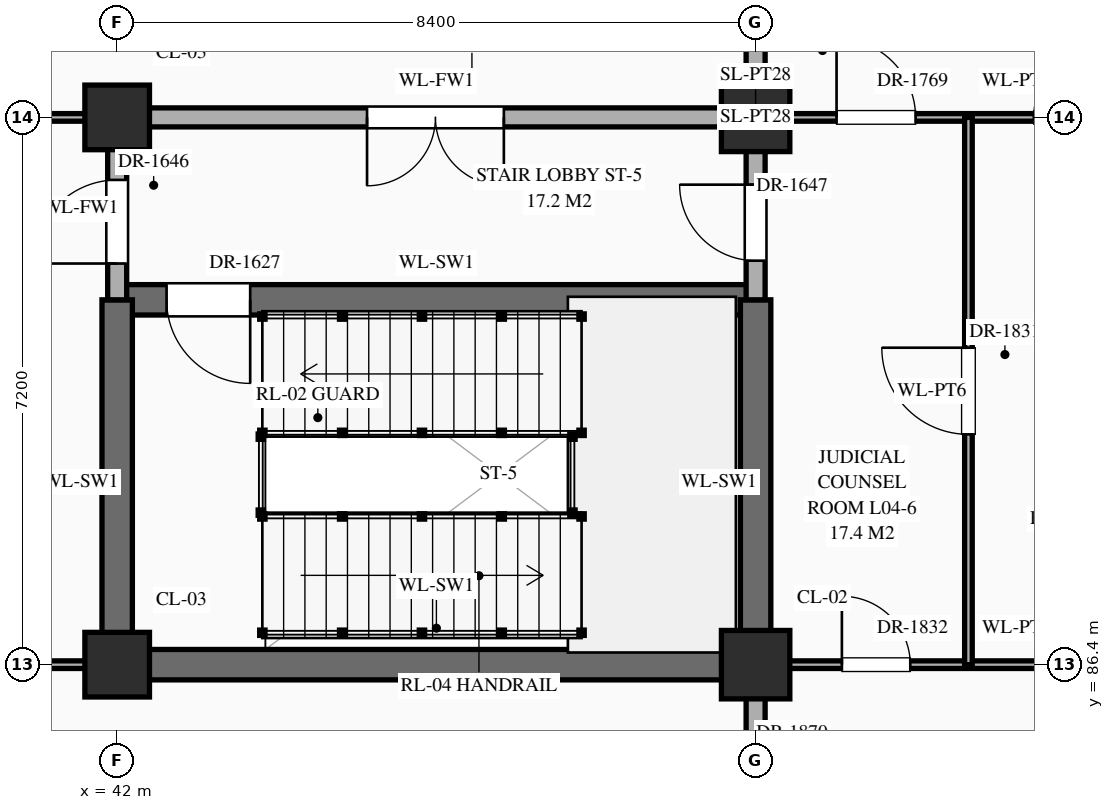
"""IFC4 building model, lengths in metres.
Left out: names, types, materials, properties, quantities, classifications, styles, units other than length and angle.
Written with IfcOpenShell. Run it as: python <this file> out.ifc"""

import sys

from ifc_helpers import new_model, si_unit, direction, frame, frame_2d, origin, origin_2d, place, context, subcontext, project, spatial, rectangle, extrude, element, fill, save


model = new_model("IFC4")
c1 = context("Model", 3, precision=1e-05, world=origin(), true_north=direction((0.0, 1.0)))
c2 = subcontext(c1, "Body", "Model", "MODEL_VIEW")
j1 = project(units=[si_unit("LENGTHUNIT", "METRE"), si_unit("PLANEANGLEUNIT", "RADIAN")], contexts=[c1])
p1 = place(None, origin())
s1 = spatial("IfcSite", under=j1, at=p1, CompositionType="ELEMENT")
p2 = place(p1, origin())
s2 = spatial("IfcBuilding", under=s1, at=p2, CompositionType="ELEMENT")
p3 = place(p2, frame((0.0, 0.0, 16.2)))
s3 = spatial("IfcBuildingStorey", under=s2, at=p3, CompositionType="ELEMENT", Elevation=16.2)
for number, where, z_axis, x_axis in (
    (1, (42.0, 86.4, 0.0), (0.0, 0.0, 1.0), (1.0, 0.0, 0.0)),
    (2, (42.0, 93.6, 0.0), (0.0, 0.0, 1.0), (1.0, 0.0, 0.0)),
):
    element("IfcColumn", number, at=place(p3, frame(where, z_axis=z_axis, x_axis=x_axis)), inside=s3, PredefinedType="COLUMN", context=c2, shape_type="SweptSolid", body=[
        extrude(rectangle(XDim=0.85, YDim=0.85, at=origin_2d()), origin(), (0.0, 0.0, 1.0), 5.4),
    ])
for number, where, z_axis, x_axis in (
    (3, (50.4, 86.4, 0.0), (0.0, 0.0, 1.0), (1.0, 0.0, 0.0)),
    (4, (50.4, 93.6, 0.0), (0.0, 0.0, 1.0), (1.0, 0.0, 0.0)),
):
    element("IfcColumn", number, at=place(p3, frame(where, z_axis=z_axis, x_axis=x_axis)), inside=s3, PredefinedType="COLUMN", context=c2, shape_type="SweptSolid", body=[
        extrude(rectangle(XDim=0.9, YDim=0.9, at=origin_2d()), origin(), (0.0, 0.0, 1.0), 5.4),
    ])
p4 = place(p3, frame((25.2, 86.4, 0.0), z_axis=(0.0, 0.0, 1.0), x_axis=(1.0, 0.0, 0.0)))
e5 = element("IfcWall", 5, at=p4, inside=s3, PredefinedType="STANDARD", context=c2, shape_type="SweptSolid", body=[
    extrude(rectangle(XDim=16.8, YDim=0.1, at=frame_2d((8.4, 0.0))), origin(), (0.0, 0.0, 1.0), 4.27),
])
p5 = place(p4, frame((0.933, 0.0, 0.0)))
e6 = element("IfcOpeningElement", 6, at=p5, cuts=e5, PredefinedType="OPENING", context=c2, shape_type="SweptSolid", body=[
    extrude(rectangle(XDim=1.28, YDim=2.35, at=frame_2d((0.64, 1.175))), frame((0.0, 0.062, 0.0), z_axis=(0.0, -1.0, 0.0), x_axis=(1.0, 0.0, 0.0)), (0.0, 0.0, 1.0), 0.124),
])
p6 = place(p4, frame((3.425, 0.0, 0.0)))
e7 = element("IfcOpeningElement", 7, at=p6, cuts=e5, PredefinedType="OPENING", context=c2, shape_type="SweptSolid", body=[
    extrude(rectangle(XDim=1.55, YDim=2.35, at=frame_2d((0.775, 1.175))), frame((0.0, 0.062, 0.0), z_axis=(0.0, -1.0, 0.0), x_axis=(1.0, 0.0, 0.0)), (0.0, 0.0, 1.0), 0.124),
])
p7 = place(p4, frame((6.317, 0.0, 0.0)))
e8 = element("IfcOpeningElement", 8, at=p7, cuts=e5, PredefinedType="OPENING", context=c2, shape_type="SweptSolid", body=[
    extrude(rectangle(XDim=1.02, YDim=2.4, at=frame_2d((0.51, 1.2))), frame((0.0, 0.062, 0.0), z_axis=(0.0, -1.0, 0.0), x_axis=(1.0, 0.0, 0.0)), (0.0, 0.0, 1.0), 0.124),
])
p8 = place(p4, frame((12.07, 0.0, 0.0)))
e9 = element("IfcOpeningElement", 9, at=p8, cuts=e5, PredefinedType="OPENING", context=c2, shape_type="SweptSolid", body=[
    extrude(rectangle(XDim=1.06, YDim=2.4, at=frame_2d((0.53, 1.2))), frame((0.0, 0.062, 0.0), z_axis=(0.0, -1.0, 0.0), x_axis=(1.0, 0.0, 0.0)), (0.0, 0.0, 1.0), 0.124),
])
p9 = place(p3, frame((42.0, 86.4, 0.0), z_axis=(0.0, 0.0, 1.0), x_axis=(1.0, 0.0, 0.0)))
e10 = element("IfcWall", 10, at=p9, inside=s3, PredefinedType="SHEAR", context=c2, shape_type="SweptSolid", body=[
    extrude(rectangle(XDim=8.4, YDim=0.4, at=frame_2d((4.2, 0.0))), origin(), (0.0, 0.0, 1.0), 5.12),
])
p10 = place(p3, frame((50.4, 86.4, 0.0), z_axis=(0.0, 0.0, 1.0), x_axis=(1.0, 0.0, 0.0)))
e11 = element("IfcWall", 11, at=p10, inside=s3, PredefinedType="STANDARD", context=c2, shape_type="SweptSolid", body=[
    extrude(rectangle(XDim=8.4, YDim=0.1, at=frame_2d((4.2, 0.0))), origin(), (0.0, 0.0, 1.0), 4.27),
])
p11 = place(p10, frame((1.135, 0.0, 0.0)))
e12 = element("IfcOpeningElement", 12, at=p11, cuts=e11, PredefinedType="OPENING", context=c2, shape_type="SweptSolid", body=[
    extrude(rectangle(XDim=0.9, YDim=2.15, at=frame_2d((0.45, 1.075))), frame((0.0, 0.062, 0.0), z_axis=(0.0, -1.0, 0.0), x_axis=(1.0, 0.0, 0.0)), (0.0, 0.0, 1.0), 0.124),
])
p12 = place(p10, frame((3.74, 0.0, 0.0)))
e13 = element("IfcOpeningElement", 13, at=p12, cuts=e11, PredefinedType="OPENING", context=c2, shape_type="SweptSolid", body=[
    extrude(rectangle(XDim=0.92, YDim=2.15, at=frame_2d((0.46, 1.075))), frame((0.0, 0.062, 0.0), z_axis=(0.0, -1.0, 0.0), x_axis=(1.0, 0.0, 0.0)), (0.0, 0.0, 1.0), 0.124),
])
p13 = place(p10, frame((6.335, 0.0, 0.0)))
e14 = element("IfcOpeningElement", 14, at=p13, cuts=e11, PredefinedType="OPENING", context=c2, shape_type="SweptSolid", body=[
    extrude(rectangle(XDim=0.96, YDim=2.2, at=frame_2d((0.48, 1.1))), frame((0.0, 0.062, 0.0), z_axis=(0.0, -1.0, 0.0), x_axis=(1.0, 0.0, 0.0)), (0.0, 0.0, 1.0), 0.124),
])
p14 = place(p3, frame((42.0, 91.2, 0.0), z_axis=(0.0, 0.0, 1.0), x_axis=(1.0, 0.0, 0.0)))
e15 = element("IfcWall", 15, at=p14, inside=s3, PredefinedType="SHEAR", context=c2, shape_type="SweptSolid", body=[
    extrude(rectangle(XDim=8.4, YDim=0.4, at=frame_2d((4.2, 0.0))), origin(), (0.0, 0.0, 1.0), 5.12),
])
p15 = place(p14, frame((0.65, 0.0, 0.0)))
e16 = element("IfcOpeningElement", 16, at=p15, cuts=e15, PredefinedType="OPENING", context=c2, shape_type="SweptSolid", body=[
    extrude(rectangle(XDim=1.1, YDim=2.2, at=frame_2d((0.55, 1.1))), frame((0.0, 0.212, 0.0), z_axis=(0.0, -1.0, 0.0), x_axis=(1.0, 0.0, 0.0)), (0.0, 0.0, 1.0), 0.424),
])
p16 = place(p3, frame((25.2, 93.6, 0.0), z_axis=(0.0, 0.0, 1.0), x_axis=(1.0, 0.0, 0.0)))
e17 = element("IfcWall", 17, at=p16, inside=s3, PredefinedType="STANDARD", context=c2, shape_type="SweptSolid", body=[
    extrude(rectangle(XDim=16.8, YDim=0.1, at=frame_2d((8.4, 0.0))), origin(), (0.0, 0.0, 1.0), 4.27),
])
p17 = place(p16, frame((0.933, 0.0, 0.0)))
e18 = element("IfcOpeningElement", 18, at=p17, cuts=e17, PredefinedType="OPENING", context=c2, shape_type="SweptSolid", body=[
    extrude(rectangle(XDim=1.28, YDim=2.35, at=frame_2d((0.64, 1.175))), frame((0.0, 0.062, 0.0), z_axis=(0.0, -1.0, 0.0), x_axis=(1.0, 0.0, 0.0)), (0.0, 0.0, 1.0), 0.124),
])
p18 = place(p16, frame((3.25, 0.0, 0.0)))
e19 = element("IfcOpeningElement", 19, at=p18, cuts=e17, PredefinedType="OPENING", context=c2, shape_type="SweptSolid", body=[
    extrude(rectangle(XDim=1.9, YDim=2.5, at=frame_2d((0.95, 1.25))), frame((0.0, 0.062, 0.0), z_axis=(0.0, -1.0, 0.0), x_axis=(1.0, 0.0, 0.0)), (0.0, 0.0, 1.0), 0.124),
])
p19 = place(p16, frame((6.337, 0.0, 0.0)))
e20 = element("IfcOpeningElement", 20, at=p19, cuts=e17, PredefinedType="OPENING", context=c2, shape_type="SweptSolid", body=[
    extrude(rectangle(XDim=0.98, YDim=2.35, at=frame_2d((0.49, 1.175))), frame((0.0, 0.062, 0.0), z_axis=(0.0, -1.0, 0.0), x_axis=(1.0, 0.0, 0.0)), (0.0, 0.0, 1.0), 0.124),
])
p20 = place(p16, frame((12.09, 0.0, 0.0)))
e21 = element("IfcOpeningElement", 21, at=p20, cuts=e17, PredefinedType="OPENING", context=c2, shape_type="SweptSolid", body=[
    extrude(rectangle(XDim=1.02, YDim=2.4, at=frame_2d((0.51, 1.2))), frame((0.0, 0.062, 0.0), z_axis=(0.0, -1.0, 0.0), x_axis=(1.0, 0.0, 0.0)), (0.0, 0.0, 1.0), 0.124),
])
p21 = place(p3, frame((42.0, 93.6, 0.0), z_axis=(0.0, 0.0, 1.0), x_axis=(1.0, 0.0, 0.0)))
e22 = element("IfcWall", 22, at=p21, inside=s3, PredefinedType="STANDARD", context=c2, shape_type="SweptSolid", body=[
    extrude(rectangle(XDim=8.4, YDim=0.25, at=frame_2d((4.2, 0.0))), origin(), (0.0, 0.0, 1.0), 4.27),
])
p22 = place(p21, frame((3.288, 0.0, 0.0)))
e23 = element("IfcOpeningElement", 23, at=p22, cuts=e22, PredefinedType="OPENING", context=c2, shape_type="SweptSolid", body=[
    extrude(rectangle(XDim=1.8, YDim=2.35, at=frame_2d((0.9, 1.175))), frame((0.0, 0.137, 0.0), z_axis=(0.0, -1.0, 0.0), x_axis=(1.0, 0.0, 0.0)), (0.0, 0.0, 1.0), 0.274),
])
p23 = place(p3, frame((50.4, 93.6, 0.0), z_axis=(0.0, 0.0, 1.0), x_axis=(1.0, 0.0, 0.0)))
e24 = element("IfcWall", 24, at=p23, inside=s3, PredefinedType="STANDARD", context=c2, shape_type="SweptSolid", body=[
    extrude(rectangle(XDim=8.4, YDim=0.1, at=frame_2d((4.2, 0.0))), origin(), (0.0, 0.0, 1.0), 4.27),
])
p24 = place(p23, frame((1.065, 0.0, 0.0)))
e25 = element("IfcOpeningElement", 25, at=p24, cuts=e24, PredefinedType="OPENING", context=c2, shape_type="SweptSolid", body=[
    extrude(rectangle(XDim=1.04, YDim=2.2, at=frame_2d((0.52, 1.1))), frame((0.0, 0.062, 0.0), z_axis=(0.0, -1.0, 0.0), x_axis=(1.0, 0.0, 0.0)), (0.0, 0.0, 1.0), 0.124),
])
p25 = place(p23, frame((3.66, 0.0, 0.0)))
e26 = element("IfcOpeningElement", 26, at=p25, cuts=e24, PredefinedType="OPENING", context=c2, shape_type="SweptSolid", body=[
    extrude(rectangle(XDim=1.08, YDim=2.25, at=frame_2d((0.54, 1.125))), frame((0.0, 0.062, 0.0), z_axis=(0.0, -1.0, 0.0), x_axis=(1.0, 0.0, 0.0)), (0.0, 0.0, 1.0), 0.124),
])
p26 = place(p23, frame((6.255, 0.0, 0.0)))
e27 = element("IfcOpeningElement", 27, at=p26, cuts=e24, PredefinedType="OPENING", context=c2, shape_type="SweptSolid", body=[
    extrude(rectangle(XDim=1.12, YDim=2.25, at=frame_2d((0.56, 1.125))), frame((0.0, 0.062, 0.0), z_axis=(0.0, -1.0, 0.0), x_axis=(1.0, 0.0, 0.0)), (0.0, 0.0, 1.0), 0.124),
])
p27 = place(p3, frame((42.0, 86.4, 0.0), z_axis=(0.0, 0.0, 1.0), x_axis=(0.0, 1.0, 0.0)))
e28 = element("IfcWall", 28, at=p27, inside=s3, PredefinedType="SHEAR", context=c2, shape_type="SweptSolid", body=[
    extrude(rectangle(XDim=4.8, YDim=0.4, at=frame_2d((2.4, 0.0))), origin(), (0.0, 0.0, 1.0), 5.12),
])
p28 = place(p3, frame((42.0, 91.2, 0.0), z_axis=(0.0, 0.0, 1.0), x_axis=(0.0, 1.0, 0.0)))
e29 = element("IfcWall", 29, at=p28, inside=s3, PredefinedType="STANDARD", context=c2, shape_type="SweptSolid", body=[
    extrude(rectangle(XDim=2.4, YDim=0.25, at=frame_2d((1.2, 0.0))), origin(), (0.0, 0.0, 1.0), 4.37),
])
p29 = place(p28, frame((0.478, 0.0, 0.0)))
e30 = element("IfcOpeningElement", 30, at=p29, cuts=e29, PredefinedType="OPENING", context=c2, shape_type="SweptSolid", body=[
    extrude(rectangle(XDim=1.1, YDim=2.2, at=frame_2d((0.55, 1.1))), frame((0.0, 0.137, 0.0), z_axis=(0.0, -1.0, 0.0), x_axis=(1.0, 0.0, 0.0)), (0.0, 0.0, 1.0), 0.274),
])
p30 = place(p3, frame((50.4, 79.24, 0.0), z_axis=(0.0, 0.0, 1.0), x_axis=(0.0, 1.0, 0.0)))
e31 = element("IfcWall", 31, at=p30, inside=s3, PredefinedType="STANDARD", context=c2, shape_type="SweptSolid", body=[
    extrude(rectangle(XDim=7.16, YDim=0.25, at=frame_2d((3.58, 0.0))), origin(), (0.0, 0.0, 1.0), 4.37),
])
p31 = place(p30, frame((5.3, 0.0, 0.0)))
e32 = element("IfcOpeningElement", 32, at=p31, cuts=e31, PredefinedType="OPENING", context=c2, shape_type="SweptSolid", body=[
    extrude(rectangle(XDim=0.95, YDim=2.15, at=frame_2d((0.475, 1.075))), frame((0.0, 0.137, 0.0), z_axis=(0.0, -1.0, 0.0), x_axis=(1.0, 0.0, 0.0)), (0.0, 0.0, 1.0), 0.274),
])
p32 = place(p3, frame((50.4, 86.4, 0.0), z_axis=(0.0, 0.0, 1.0), x_axis=(0.0, 1.0, 0.0)))
e33 = element("IfcWall", 33, at=p32, inside=s3, PredefinedType="SHEAR", context=c2, shape_type="SweptSolid", body=[
    extrude(rectangle(XDim=4.8, YDim=0.4, at=frame_2d((2.4, 0.0))), origin(), (0.0, 0.0, 1.0), 5.12),
])
p33 = place(p3, frame((50.4, 91.2, 0.0), z_axis=(0.0, 0.0, 1.0), x_axis=(0.0, 1.0, 0.0)))
e34 = element("IfcWall", 34, at=p33, inside=s3, PredefinedType="STANDARD", context=c2, shape_type="SweptSolid", body=[
    extrude(rectangle(XDim=13.2, YDim=0.25, at=frame_2d((6.6, 0.0))), origin(), (0.0, 0.0, 1.0), 4.37),
])
p34 = place(p33, frame((0.515, 0.0, 0.0)))
e35 = element("IfcOpeningElement", 35, at=p34, cuts=e34, PredefinedType="OPENING", context=c2, shape_type="SweptSolid", body=[
    extrude(rectangle(XDim=1.0, YDim=2.2, at=frame_2d((0.5, 1.1))), frame((0.0, 0.137, 0.0), z_axis=(0.0, -1.0, 0.0), x_axis=(1.0, 0.0, 0.0)), (0.0, 0.0, 1.0), 0.274),
])
p35 = place(p33, frame((10.485, 0.0, 0.0)))
e36 = element("IfcOpeningElement", 36, at=p35, cuts=e34, PredefinedType="OPENING", context=c2, shape_type="SweptSolid", body=[
    extrude(rectangle(XDim=1.0, YDim=2.2, at=frame_2d((0.5, 1.1))), frame((0.0, 0.137, 0.0), z_axis=(0.0, -1.0, 0.0), x_axis=(1.0, 0.0, 0.0)), (0.0, 0.0, 1.0), 0.274),
])
p36 = place(p33, frame((3.285, 0.0, 0.0)))
e37 = element("IfcOpeningElement", 37, at=p36, cuts=e34, PredefinedType="OPENING", context=c2, shape_type="SweptSolid", body=[
    extrude(rectangle(XDim=1.0, YDim=2.2, at=frame_2d((0.5, 1.1))), frame((0.0, 0.137, 0.0), z_axis=(0.0, -1.0, 0.0), x_axis=(1.0, 0.0, 0.0)), (0.0, 0.0, 1.0), 0.274),
])
p37 = place(p3, frame((53.2, 86.4, 0.0), z_axis=(0.0, 0.0, 1.0), x_axis=(0.0, 1.0, 0.0)))
e38 = element("IfcWall", 38, at=p37, inside=s3, PredefinedType="STANDARD", context=c2, shape_type="SweptSolid", body=[
    extrude(rectangle(XDim=7.2, YDim=0.1, at=frame_2d((3.6, 0.0))), origin(), (0.0, 0.0, 1.0), 5.12),
])
p38 = place(p37, frame((3.03, 0.0, 0.0)))
e39 = element("IfcOpeningElement", 39, at=p38, cuts=e38, PredefinedType="OPENING", context=c2, shape_type="SweptSolid", body=[
    extrude(rectangle(XDim=1.14, YDim=2.4, at=frame_2d((0.57, 1.2))), frame((0.0, 0.062, 0.0), z_axis=(0.0, -1.0, 0.0), x_axis=(1.0, 0.0, 0.0)), (0.0, 0.0, 1.0), 0.124),
])
p39 = place(p15, frame((1.1, 0.0, 0.0), z_axis=(0.0, 0.0, 1.0), x_axis=(-1.0, 0.0, 0.0)))
e40 = element("IfcDoor", 40, at=p39, inside=s3, OperationType="SINGLE_SWING_LEFT", PredefinedType="DOOR", context=c2, shape_type="SweptSolid", body=[
    extrude(rectangle(XDim=1.1, YDim=2.2, at=frame_2d((0.55, 1.1))), frame((0.0, 0.025, 0.0), z_axis=(0.0, -1.0, 0.0), x_axis=(1.0, 0.0, 0.0)), (0.0, 0.0, 1.0), 0.05),
])
fill(e16, e40)
p40 = place(p22, frame((1.8, 0.0, 0.0), z_axis=(0.0, 0.0, 1.0), x_axis=(-1.0, 0.0, 0.0)))
e41 = element("IfcDoor", 41, at=p40, inside=s3, OperationType="DOUBLE_DOOR_SINGLE_SWING", PredefinedType="DOOR", context=c2, shape_type="SweptSolid", body=[
    extrude(rectangle(XDim=1.8, YDim=2.35, at=frame_2d((0.9, 1.175))), frame((0.0, 0.025, 0.0), z_axis=(0.0, -1.0, 0.0), x_axis=(1.0, 0.0, 0.0)), (0.0, 0.0, 1.0), 0.05),
])
fill(e23, e41)
p41 = place(p29, origin())
e42 = element("IfcDoor", 42, at=p41, inside=s3, OperationType="SINGLE_SWING_LEFT", PredefinedType="DOOR", context=c2, shape_type="SweptSolid", body=[
    extrude(rectangle(XDim=1.1, YDim=2.2, at=frame_2d((0.55, 1.1))), frame((0.0, 0.025, 0.0), z_axis=(0.0, -1.0, 0.0), x_axis=(1.0, 0.0, 0.0)), (0.0, 0.0, 1.0), 0.05),
])
fill(e30, e42)
p42 = place(p34, origin())
e43 = element("IfcDoor", 43, at=p42, inside=s3, OperationType="SINGLE_SWING_RIGHT", PredefinedType="DOOR", context=c2, shape_type="SweptSolid", body=[
    extrude(rectangle(XDim=1.0, YDim=2.2, at=frame_2d((0.5, 1.1))), frame((0.0, 0.025, 0.0), z_axis=(0.0, -1.0, 0.0), x_axis=(1.0, 0.0, 0.0)), (0.0, 0.0, 1.0), 0.05),
])
fill(e35, e43)
p43 = place(p24, origin())
e44 = element("IfcDoor", 44, at=p43, inside=s3, OperationType="SINGLE_SWING_LEFT", PredefinedType="DOOR", context=c2, shape_type="SweptSolid", body=[
    extrude(rectangle(XDim=1.04, YDim=2.2, at=frame_2d((0.52, 1.1))), frame((0.0, 0.025, 0.0), z_axis=(0.0, -1.0, 0.0), x_axis=(1.0, 0.0, 0.0)), (0.0, 0.0, 1.0), 0.05),
])
fill(e25, e44)
p44 = place(p25, origin())
e45 = element("IfcDoor", 45, at=p44, inside=s3, OperationType="SINGLE_SWING_RIGHT", PredefinedType="DOOR", context=c2, shape_type="SweptSolid", body=[
    extrude(rectangle(XDim=1.08, YDim=2.25, at=frame_2d((0.54, 1.125))), frame((0.0, 0.025, 0.0), z_axis=(0.0, -1.0, 0.0), x_axis=(1.0, 0.0, 0.0)), (0.0, 0.0, 1.0), 0.05),
])
fill(e26, e45)
p45 = place(p38, origin())
e46 = element("IfcDoor", 46, at=p45, inside=s3, OperationType="SINGLE_SWING_RIGHT", PredefinedType="DOOR", context=c2, shape_type="SweptSolid", body=[
    extrude(rectangle(XDim=1.14, YDim=2.4, at=frame_2d((0.57, 1.2))), frame((0.0, 0.025, 0.0), z_axis=(0.0, -1.0, 0.0), x_axis=(1.0, 0.0, 0.0)), (0.0, 0.0, 1.0), 0.05),
])
fill(e39, e46)
p46 = place(p11, origin())
e47 = element("IfcDoor", 47, at=p46, inside=s3, OperationType="SINGLE_SWING_LEFT", PredefinedType="DOOR", context=c2, shape_type="SweptSolid", body=[
    extrude(rectangle(XDim=0.9, YDim=2.15, at=frame_2d((0.45, 1.075))), frame((0.0, 0.025, 0.0), z_axis=(0.0, -1.0, 0.0), x_axis=(1.0, 0.0, 0.0)), (0.0, 0.0, 1.0), 0.05),
])
fill(e12, e47)
save(model, sys.argv[1])
